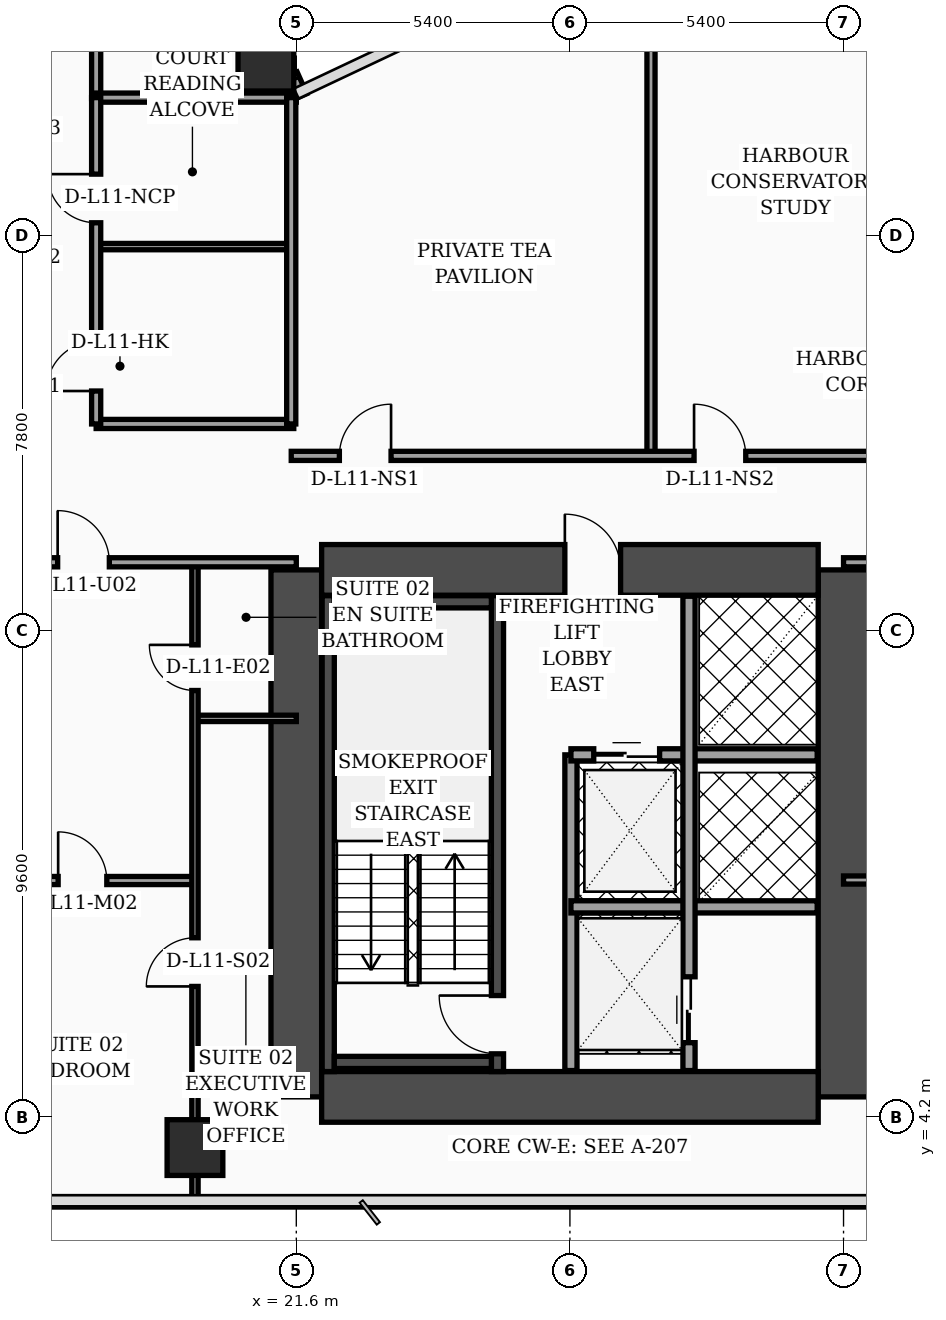
"""IFC4 building model, lengths in metres.
Left out: names, types, materials, properties, quantities, classifications, styles, units other than length and angle.
Written with IfcOpenShell. Run it as: python <this file> out.ifc"""

import sys

from ifc_helpers import new_model, si_unit, direction, frame, frame_2d, origin, origin_2d, place, context, subcontext, project, spatial, rectangle, hollow_rectangle, extrude, element, fill, save


model = new_model("IFC4")
c1 = context("Model", 3, precision=1e-05, world=origin(), true_north=direction((0.0, 1.0)))
c2 = subcontext(c1, "Body", "Model", "MODEL_VIEW")
j1 = project(units=[si_unit("LENGTHUNIT", "METRE"), si_unit("PLANEANGLEUNIT", "RADIAN")], contexts=[c1])
p1 = place(None, origin())
s1 = spatial("IfcSite", under=j1, at=p1, CompositionType="ELEMENT")
p2 = place(p1, origin())
s2 = spatial("IfcBuilding", under=s1, at=p2, CompositionType="ELEMENT")
p3 = place(p2, frame((0.0, 0.0, 50.8)))
s3 = spatial("IfcBuildingStorey", under=s2, at=p3, CompositionType="ELEMENT", Elevation=50.8)
for number, where, z_axis, x_axis in (
    (1, (21.6, 4.6, 0.0), (0.0, 0.0, 1.0), (0.0, 1.0, 0.0)),
    (2, (32.4, 4.6, 0.0), (0.0, 0.0, 1.0), (0.0, 1.0, 0.0)),
):
    element("IfcWall", number, at=place(p3, frame(where, z_axis=z_axis, x_axis=x_axis)), inside=s3, PredefinedType="SHEAR", context=c2, shape_type="SweptSolid", body=[
        extrude(rectangle(XDim=10.4, YDim=1.0, at=frame_2d((5.2, 0.0))), origin(), (0.0, 0.0, 1.0), 3.56),
    ])
p4 = place(p3, frame((22.1, 15.0, 0.0), z_axis=(0.0, 0.0, 1.0), x_axis=(1.0, 0.0, 0.0)))
e3 = element("IfcWall", 3, at=p4, inside=s3, PredefinedType="SHEAR", context=c2, shape_type="SweptSolid", body=[
    extrude(rectangle(XDim=9.8, YDim=1.0, at=frame_2d((4.9, 0.0))), origin(), (0.0, 0.0, 1.0), 3.56),
])
p5 = place(p4, frame((4.8, 0.0, 0.0)))
e4 = element("IfcOpeningElement", 4, at=p5, cuts=e3, PredefinedType="OPENING", context=c2, shape_type="SweptSolid", body=[
    extrude(rectangle(XDim=1.1, YDim=2.2, at=frame_2d((0.55, 1.1))), frame((0.0, 0.51, 0.0), z_axis=(0.0, -1.0, 0.0), x_axis=(1.0, 0.0, 0.0)), (0.0, 0.0, 1.0), 1.02),
])
p6 = place(p3, frame((22.1, 4.6, 0.0), z_axis=(0.0, 0.0, 1.0), x_axis=(1.0, 0.0, 0.0)))
e5 = element("IfcWall", 5, at=p6, inside=s3, PredefinedType="SHEAR", context=c2, shape_type="SweptSolid", body=[
    extrude(rectangle(XDim=9.8, YDim=1.0, at=frame_2d((4.9, 0.0))), origin(), (0.0, 0.0, 1.0), 3.56),
])
p7 = place(p3, frame((22.23, 5.1, 0.0), z_axis=(0.0, 0.0, 1.0), x_axis=(0.0, 1.0, 0.0)))
e6 = element("IfcWall", 6, at=p7, inside=s3, PredefinedType="SOLIDWALL", context=c2, shape_type="SweptSolid", body=[
    extrude(rectangle(XDim=9.39, YDim=0.24, at=frame_2d((4.695, 0.0))), origin(), (0.0, 0.0, 1.0), 3.56),
])
p8 = place(p3, frame((25.57, 5.1, 0.0), z_axis=(0.0, 0.0, 1.0), x_axis=(0.0, 1.0, 0.0)))
e7 = element("IfcWall", 7, at=p8, inside=s3, PredefinedType="SOLIDWALL", context=c2, shape_type="SweptSolid", body=[
    extrude(rectangle(XDim=9.39, YDim=0.24, at=frame_2d((4.695, 0.0))), origin(), (0.0, 0.0, 1.0), 3.56),
])
p9 = place(p8, frame((0.35, 0.0, 0.0)))
e8 = element("IfcOpeningElement", 8, at=p9, cuts=e7, PredefinedType="OPENING", context=c2, shape_type="SweptSolid", body=[
    extrude(rectangle(XDim=1.15, YDim=2.2, at=frame_2d((0.575, 1.1))), frame((0.0, 0.13, 0.0), z_axis=(0.0, -1.0, 0.0), x_axis=(1.0, 0.0, 0.0)), (0.0, 0.0, 1.0), 0.26),
])
for number, where, z_axis, x_axis in (
    (9, (22.35, 5.28, 0.0), (0.0, 0.0, 1.0), (1.0, 0.0, 0.0)),
    (10, (22.35, 14.37, 0.0), (0.0, 0.0, 1.0), (1.0, 0.0, 0.0)),
):
    element("IfcWall", number, at=place(p3, frame(where, z_axis=z_axis, x_axis=x_axis)), inside=s3, PredefinedType="SOLIDWALL", context=c2, shape_type="SweptSolid", body=[
        extrude(rectangle(XDim=3.1, YDim=0.24, at=frame_2d((1.55, 0.0))), origin(), (0.0, 0.0, 1.0), 3.56),
    ])
for number, where, z_axis, x_axis in (
    (11, (21.0, 25.0, 0.0), (0.0, 0.0, 1.0), (1.0, 0.0, 0.0)),
    (12, (19.6, 3.6, 0.0), (0.0, 0.0, 1.0), (1.0, 0.0, 0.0)),
):
    element("IfcColumn", number, at=place(p3, frame(where, z_axis=z_axis, x_axis=x_axis)), inside=s3, PredefinedType="COLUMN", context=c2, shape_type="SweptSolid", body=[
        extrude(hollow_rectangle(XDim=1.1, YDim=1.1, WallThickness=0.045, at=origin_2d()), origin(), (0.0, 0.0, 1.0), 3.56),
    ])
p10 = place(p3, frame((21.68, 24.34, 0.0), z_axis=(0.0, 0.0, 1.0), x_axis=(-0.40758134973, 0.913168901875, 0.0)))
e13 = element("IfcWall", 13, at=p10, inside=s3, PredefinedType="SOLIDWALL", context=c2, shape_type="SweptSolid", body=[
    extrude(rectangle(XDim=0.471, YDim=0.28, at=frame_2d((0.235, 0.0))), origin(), (0.0, 0.0, 1.0), 3.56),
])
p11 = place(p3, frame((27.02, 5.12, 0.0), z_axis=(0.0, 0.0, 1.0), x_axis=(0.0, 1.0, 0.0)))
e14 = element("IfcWall", 14, at=p11, inside=s3, PredefinedType="SOLIDWALL", context=c2, shape_type="SweptSolid", body=[
    extrude(rectangle(XDim=6.23, YDim=0.24, at=frame_2d((3.115, 0.0))), origin(), (0.0, 0.0, 1.0), 3.56),
])
p12 = place(p3, frame((27.02, 11.35, 0.0), z_axis=(0.0, 0.0, 1.0), x_axis=(1.0, 0.0, 0.0)))
e15 = element("IfcWall", 15, at=p12, inside=s3, PredefinedType="SOLIDWALL", context=c2, shape_type="SweptSolid", body=[
    extrude(rectangle(XDim=4.86, YDim=0.24, at=frame_2d((2.43, 0.0))), origin(), (0.0, 0.0, 1.0), 3.56),
])
p13 = place(p12, frame((0.45, 0.0, 0.0)))
e16 = element("IfcOpeningElement", 16, at=p13, cuts=e15, PredefinedType="OPENING", context=c2, shape_type="SweptSolid", body=[
    extrude(rectangle(XDim=1.3, YDim=2.35, at=frame_2d((0.65, 1.175))), frame((0.0, 0.13, 0.0), z_axis=(0.0, -1.0, 0.0), x_axis=(1.0, 0.0, 0.0)), (0.0, 0.0, 1.0), 0.26),
])
p14 = place(p3, frame((27.02, 8.35, 0.0), z_axis=(0.0, 0.0, 1.0), x_axis=(1.0, 0.0, 0.0)))
e17 = element("IfcWall", 17, at=p14, inside=s3, PredefinedType="SOLIDWALL", context=c2, shape_type="SweptSolid", body=[
    extrude(rectangle(XDim=4.86, YDim=0.24, at=frame_2d((2.43, 0.0))), origin(), (0.0, 0.0, 1.0), 3.09),
])
p15 = place(p3, frame((29.35, 5.12, 0.0), z_axis=(0.0, 0.0, 1.0), x_axis=(0.0, 1.0, 0.0)))
e18 = element("IfcWall", 18, at=p15, inside=s3, PredefinedType="SOLIDWALL", context=c2, shape_type="SweptSolid", body=[
    extrude(rectangle(XDim=9.36, YDim=0.24, at=frame_2d((4.68, 0.0))), origin(), (0.0, 0.0, 1.0), 3.56),
])
p16 = place(p15, frame((0.55, 0.0, 0.0)))
e19 = element("IfcOpeningElement", 19, at=p16, cuts=e18, PredefinedType="OPENING", context=c2, shape_type="SweptSolid", body=[
    extrude(rectangle(XDim=1.3, YDim=2.35, at=frame_2d((0.65, 1.175))), frame((0.0, 0.13, 0.0), z_axis=(0.0, -1.0, 0.0), x_axis=(1.0, 0.0, 0.0)), (0.0, 0.0, 1.0), 0.26),
])
p17 = place(p3, frame((19.6, 12.07, 0.0), z_axis=(0.0, 0.0, 1.0), x_axis=(1.0, 0.0, 0.0)))
e20 = element("IfcWall", 20, at=p17, inside=s3, PredefinedType="PARTITIONING", context=c2, shape_type="SweptSolid", body=[
    extrude(rectangle(XDim=2.0, YDim=0.125, at=frame_2d((1.0, 0.0))), origin(), (0.0, 0.0, 1.0), 3.56),
])
p18 = place(p3, frame((15.15, 8.87, 0.0), z_axis=(0.0, 0.0, 1.0), x_axis=(1.0, 0.0, 0.0)))
e21 = element("IfcWall", 21, at=p18, inside=s3, PredefinedType="PARTITIONING", context=c2, shape_type="SweptSolid", body=[
    extrude(rectangle(XDim=4.45, YDim=0.16, at=frame_2d((2.225, 0.0))), origin(), (0.0, 0.0, 1.0), 3.56),
])
p19 = place(p18, frame((1.75, 0.0, 0.0)))
e22 = element("IfcOpeningElement", 22, at=p19, cuts=e21, PredefinedType="OPENING", context=c2, shape_type="SweptSolid", body=[
    extrude(rectangle(XDim=0.96, YDim=2.2, at=frame_2d((0.48, 1.1))), frame((0.0, 0.09, 0.0), z_axis=(0.0, -1.0, 0.0), x_axis=(1.0, 0.0, 0.0)), (0.0, 0.0, 1.0), 0.18),
])
p20 = place(p3, frame((19.6, 2.44, 0.0), z_axis=(0.0, 0.0, 1.0), x_axis=(0.0, 1.0, 0.0)))
e23 = element("IfcWall", 23, at=p20, inside=s3, PredefinedType="PARTITIONING", context=c2, shape_type="SweptSolid", body=[
    extrude(rectangle(XDim=12.71, YDim=0.125, at=frame_2d((6.355, 0.0))), origin(), (0.0, 0.0, 1.0), 2.34),
])
p21 = place(p20, frame((4.34, 0.0, 0.0)))
e24 = element("IfcOpeningElement", 24, at=p21, cuts=e23, PredefinedType="OPENING", context=c2, shape_type="SweptSolid", body=[
    extrude(rectangle(XDim=0.96, YDim=2.2, at=frame_2d((0.48, 1.1))), frame((0.0, 0.073, 0.0), z_axis=(0.0, -1.0, 0.0), x_axis=(1.0, 0.0, 0.0)), (0.0, 0.0, 1.0), 0.145),
])
p22 = place(p20, frame((10.18, 0.0, 0.0)))
e25 = element("IfcOpeningElement", 25, at=p22, cuts=e23, PredefinedType="OPENING", context=c2, shape_type="SweptSolid", body=[
    extrude(rectangle(XDim=0.9, YDim=2.15, at=frame_2d((0.45, 1.075))), frame((0.0, 0.073, 0.0), z_axis=(0.0, -1.0, 0.0), x_axis=(1.0, 0.0, 0.0)), (0.0, 0.0, 1.0), 0.145),
])
p23 = place(p3, frame((15.15, 15.15, 0.0), z_axis=(0.0, 0.0, 1.0), x_axis=(1.0, 0.0, 0.0)))
e26 = element("IfcWall", 26, at=p23, inside=s3, PredefinedType="PARTITIONING", context=c2, shape_type="SweptSolid", body=[
    extrude(rectangle(XDim=6.45, YDim=0.18, at=frame_2d((3.225, 0.0))), origin(), (0.0, 0.0, 1.0), 2.34),
])
p24 = place(p23, frame((1.74, 0.0, 0.0)))
e27 = element("IfcOpeningElement", 27, at=p24, cuts=e26, PredefinedType="OPENING", context=c2, shape_type="SweptSolid", body=[
    extrude(rectangle(XDim=1.02, YDim=2.2, at=frame_2d((0.51, 1.1))), frame((0.0, 0.1, 0.0), z_axis=(0.0, -1.0, 0.0), x_axis=(1.0, 0.0, 0.0)), (0.0, 0.0, 1.0), 0.2),
])
p25 = place(p3, frame((17.65, 24.3, 0.0), z_axis=(0.0, 0.0, 1.0), x_axis=(0.0, 1.0, 0.0)))
e28 = element("IfcWall", 28, at=p25, inside=s3, PredefinedType="PARTITIONING", context=c2, shape_type="SweptSolid", body=[
    extrude(rectangle(XDim=16.4, YDim=0.18, at=frame_2d((8.2, 0.0))), origin(), (0.0, 0.0, 1.0), 2.84),
])
p26 = place(p3, frame((17.65, 17.88, 0.0), z_axis=(0.0, 0.0, 1.0), x_axis=(1.0, 0.0, 0.0)))
e29 = element("IfcWall", 29, at=p26, inside=s3, PredefinedType="PARTITIONING", context=c2, shape_type="SweptSolid", body=[
    extrude(rectangle(XDim=3.9, YDim=0.18, at=frame_2d((1.95, 0.0))), origin(), (0.0, 0.0, 1.0), 3.56),
])
p27 = place(p3, frame((17.65, 21.38, 0.0), z_axis=(0.0, 0.0, 1.0), x_axis=(1.0, 0.0, 0.0)))
e30 = element("IfcWall", 30, at=p27, inside=s3, PredefinedType="PARTITIONING", context=c2, shape_type="SweptSolid", body=[
    extrude(rectangle(XDim=3.9, YDim=0.125, at=frame_2d((1.95, 0.0))), origin(), (0.0, 0.0, 1.0), 3.56),
])
p28 = place(p3, frame((17.65, 24.32, 0.0), z_axis=(0.0, 0.0, 1.0), x_axis=(1.0, 0.0, 0.0)))
e31 = element("IfcWall", 31, at=p28, inside=s3, PredefinedType="PARTITIONING", context=c2, shape_type="SweptSolid", body=[
    extrude(rectangle(XDim=3.95, YDim=0.18, at=frame_2d((1.975, 0.0))), origin(), (0.0, 0.0, 1.0), 3.56),
])
p29 = place(p3, frame((21.5, 17.88, 0.0), z_axis=(0.0, 0.0, 1.0), x_axis=(0.0, 1.0, 0.0)))
e32 = element("IfcWall", 32, at=p29, inside=s3, PredefinedType="PARTITIONING", context=c2, shape_type="SweptSolid", body=[
    extrude(rectangle(XDim=6.44, YDim=0.18, at=frame_2d((3.22, 0.0))), origin(), (0.0, 0.0, 1.0), 3.56),
])
p30 = place(p3, frame((17.65, 17.88, 0.0), z_axis=(0.0, 0.0, 1.0), x_axis=(0.0, 1.0, 0.0)))
e33 = element("IfcWall", 33, at=p30, inside=s3, PredefinedType="PARTITIONING", context=c2, shape_type="SweptSolid", body=[
    extrude(rectangle(XDim=6.44, YDim=0.18, at=frame_2d((3.22, 0.0))), origin(), (0.0, 0.0, 1.0), 3.56),
])
p31 = place(p30, frame((0.65, 0.0, 0.0)))
e34 = element("IfcOpeningElement", 34, at=p31, cuts=e33, PredefinedType="OPENING", context=c2, shape_type="SweptSolid", body=[
    extrude(rectangle(XDim=0.98, YDim=2.15, at=frame_2d((0.49, 1.075))), frame((0.0, 0.1, 0.0), z_axis=(0.0, -1.0, 0.0), x_axis=(1.0, 0.0, 0.0)), (0.0, 0.0, 1.0), 0.2),
])
p32 = place(p30, frame((3.97, 0.0, 0.0)))
e35 = element("IfcOpeningElement", 35, at=p32, cuts=e33, PredefinedType="OPENING", context=c2, shape_type="SweptSolid", body=[
    extrude(rectangle(XDim=0.96, YDim=2.2, at=frame_2d((0.48, 1.1))), frame((0.0, 0.1, 0.0), z_axis=(0.0, -1.0, 0.0), x_axis=(1.0, 0.0, 0.0)), (0.0, 0.0, 1.0), 0.2),
])
p33 = place(p3, frame((32.4, 8.88, 0.0), z_axis=(0.0, 0.0, 1.0), x_axis=(1.0, 0.0, 0.0)))
e36 = element("IfcWall", 36, at=p33, inside=s3, PredefinedType="PARTITIONING", context=c2, shape_type="SweptSolid", body=[
    extrude(rectangle(XDim=4.8, YDim=0.16, at=frame_2d((2.4, 0.0))), origin(), (0.0, 0.0, 1.0), 2.84),
])
p34 = place(p33, frame((1.92, 0.0, 0.0)))
e37 = element("IfcOpeningElement", 37, at=p34, cuts=e36, PredefinedType="OPENING", context=c2, shape_type="SweptSolid", body=[
    extrude(rectangle(XDim=0.96, YDim=2.2, at=frame_2d((0.48, 1.1))), frame((0.0, 0.09, 0.0), z_axis=(0.0, -1.0, 0.0), x_axis=(1.0, 0.0, 0.0)), (0.0, 0.0, 1.0), 0.18),
])
p35 = place(p3, frame((32.4, 15.15, 0.0), z_axis=(0.0, 0.0, 1.0), x_axis=(1.0, 0.0, 0.0)))
e38 = element("IfcWall", 38, at=p35, inside=s3, PredefinedType="PARTITIONING", context=c2, shape_type="SweptSolid", body=[
    extrude(rectangle(XDim=16.95, YDim=0.18, at=frame_2d((8.475, 0.0))), origin(), (0.0, 0.0, 1.0), 2.84),
])
p36 = place(p35, frame((1.99, 0.0, 0.0)))
e39 = element("IfcOpeningElement", 39, at=p36, cuts=e38, PredefinedType="OPENING", context=c2, shape_type="SweptSolid", body=[
    extrude(rectangle(XDim=1.02, YDim=2.2, at=frame_2d((0.51, 1.1))), frame((0.0, 0.1, 0.0), z_axis=(0.0, -1.0, 0.0), x_axis=(1.0, 0.0, 0.0)), (0.0, 0.0, 1.0), 0.2),
])
p37 = place(p35, frame((7.58, 0.0, 0.0)))
e40 = element("IfcOpeningElement", 40, at=p37, cuts=e38, PredefinedType="OPENING", context=c2, shape_type="SweptSolid", body=[
    extrude(rectangle(XDim=1.02, YDim=2.2, at=frame_2d((0.51, 1.1))), frame((0.0, 0.1, 0.0), z_axis=(0.0, -1.0, 0.0), x_axis=(1.0, 0.0, 0.0)), (0.0, 0.0, 1.0), 0.2),
])
p38 = place(p35, frame((12.69, 0.0, 0.0)))
e41 = element("IfcOpeningElement", 41, at=p38, cuts=e38, PredefinedType="OPENING", context=c2, shape_type="SweptSolid", body=[
    extrude(rectangle(XDim=1.02, YDim=2.2, at=frame_2d((0.51, 1.1))), frame((0.0, 0.1, 0.0), z_axis=(0.0, -1.0, 0.0), x_axis=(1.0, 0.0, 0.0)), (0.0, 0.0, 1.0), 0.2),
])
p39 = place(p3, frame((28.6, 17.25, 0.0), z_axis=(0.0, 0.0, 1.0), x_axis=(0.0, 1.0, 0.0)))
e42 = element("IfcWall", 42, at=p39, inside=s3, PredefinedType="PARTITIONING", context=c2, shape_type="SweptSolid", body=[
    extrude(rectangle(XDim=10.54, YDim=0.16, at=frame_2d((5.27, 0.0))), origin(), (0.0, 0.0, 1.0), 2.84),
])
p40 = place(p3, frame((21.5, 17.25, 0.0), z_axis=(0.0, 0.0, 1.0), x_axis=(1.0, 0.0, 0.0)))
e43 = element("IfcWall", 43, at=p40, inside=s3, PredefinedType="PARTITIONING", context=c2, shape_type="SweptSolid", body=[
    extrude(rectangle(XDim=25.5, YDim=0.18, at=frame_2d((12.75, 0.0))), origin(), (0.0, 0.0, 1.0), 2.84),
])
p41 = place(p40, frame((0.95, 0.0, 0.0)))
e44 = element("IfcOpeningElement", 44, at=p41, cuts=e43, PredefinedType="OPENING", context=c2, shape_type="SweptSolid", body=[
    extrude(rectangle(XDim=1.02, YDim=2.2, at=frame_2d((0.51, 1.1))), frame((0.0, 0.1, 0.0), z_axis=(0.0, -1.0, 0.0), x_axis=(1.0, 0.0, 0.0)), (0.0, 0.0, 1.0), 0.2),
])
p42 = place(p40, frame((7.95, 0.0, 0.0)))
e45 = element("IfcOpeningElement", 45, at=p42, cuts=e43, PredefinedType="OPENING", context=c2, shape_type="SweptSolid", body=[
    extrude(rectangle(XDim=1.02, YDim=2.2, at=frame_2d((0.51, 1.1))), frame((0.0, 0.1, 0.0), z_axis=(0.0, -1.0, 0.0), x_axis=(1.0, 0.0, 0.0)), (0.0, 0.0, 1.0), 0.2),
])
p43 = place(p40, frame((13.65, 0.0, 0.0)))
e46 = element("IfcOpeningElement", 46, at=p43, cuts=e43, PredefinedType="OPENING", context=c2, shape_type="SweptSolid", body=[
    extrude(rectangle(XDim=1.02, YDim=2.2, at=frame_2d((0.51, 1.1))), frame((0.0, 0.1, 0.0), z_axis=(0.0, -1.0, 0.0), x_axis=(1.0, 0.0, 0.0)), (0.0, 0.0, 1.0), 0.2),
])
p44 = place(p40, frame((20.0, 0.0, 0.0)))
e47 = element("IfcOpeningElement", 47, at=p44, cuts=e43, PredefinedType="OPENING", context=c2, shape_type="SweptSolid", body=[
    extrude(rectangle(XDim=1.02, YDim=2.2, at=frame_2d((0.51, 1.1))), frame((0.0, 0.1, 0.0), z_axis=(0.0, -1.0, 0.0), x_axis=(1.0, 0.0, 0.0)), (0.0, 0.0, 1.0), 0.2),
])
p45 = place(p13, origin())
e48 = element("IfcDoor", 48, at=p45, inside=s3, OperationType="DOUBLE_DOOR_SLIDING", PredefinedType="DOOR", context=c2, shape_type="SweptSolid", body=[
    extrude(rectangle(XDim=1.3, YDim=2.35, at=frame_2d((0.65, 1.175))), frame((0.0, 0.025, 0.0), z_axis=(0.0, -1.0, 0.0), x_axis=(1.0, 0.0, 0.0)), (0.0, 0.0, 1.0), 0.05),
])
fill(e16, e48)
p46 = place(p16, origin())
e49 = element("IfcDoor", 49, at=p46, inside=s3, OperationType="DOUBLE_DOOR_SLIDING", PredefinedType="DOOR", context=c2, shape_type="SweptSolid", body=[
    extrude(rectangle(XDim=1.3, YDim=2.35, at=frame_2d((0.65, 1.175))), frame((0.0, 0.025, 0.0), z_axis=(0.0, -1.0, 0.0), x_axis=(1.0, 0.0, 0.0)), (0.0, 0.0, 1.0), 0.05),
])
fill(e19, e49)
p47 = place(p19, origin())
e50 = element("IfcDoor", 50, at=p47, inside=s3, OperationType="SINGLE_SWING_LEFT", PredefinedType="DOOR", context=c2, shape_type="SweptSolid", body=[
    extrude(rectangle(XDim=0.96, YDim=2.2, at=frame_2d((0.48, 1.1))), frame((0.0, 0.025, 0.0), z_axis=(0.0, -1.0, 0.0), x_axis=(1.0, 0.0, 0.0)), (0.0, 0.0, 1.0), 0.05),
])
fill(e22, e50)
p48 = place(p21, origin())
e51 = element("IfcDoor", 51, at=p48, inside=s3, OperationType="SINGLE_SWING_LEFT", PredefinedType="DOOR", context=c2, shape_type="SweptSolid", body=[
    extrude(rectangle(XDim=0.96, YDim=2.2, at=frame_2d((0.48, 1.1))), frame((0.0, 0.025, 0.0), z_axis=(0.0, -1.0, 0.0), x_axis=(1.0, 0.0, 0.0)), (0.0, 0.0, 1.0), 0.05),
])
fill(e24, e51)
p49 = place(p22, origin())
e52 = element("IfcDoor", 52, at=p49, inside=s3, OperationType="SINGLE_SWING_RIGHT", PredefinedType="DOOR", context=c2, shape_type="SweptSolid", body=[
    extrude(rectangle(XDim=0.9, YDim=2.15, at=frame_2d((0.45, 1.075))), frame((0.0, 0.025, 0.0), z_axis=(0.0, -1.0, 0.0), x_axis=(1.0, 0.0, 0.0)), (0.0, 0.0, 1.0), 0.05),
])
fill(e25, e52)
p50 = place(p24, origin())
e53 = element("IfcDoor", 53, at=p50, inside=s3, OperationType="SINGLE_SWING_LEFT", PredefinedType="DOOR", context=c2, shape_type="SweptSolid", body=[
    extrude(rectangle(XDim=1.02, YDim=2.2, at=frame_2d((0.51, 1.1))), frame((0.0, 0.025, 0.0), z_axis=(0.0, -1.0, 0.0), x_axis=(1.0, 0.0, 0.0)), (0.0, 0.0, 1.0), 0.05),
])
fill(e27, e53)
p51 = place(p31, origin())
e54 = element("IfcDoor", 54, at=p51, inside=s3, OperationType="SINGLE_SWING_LEFT", PredefinedType="DOOR", context=c2, shape_type="SweptSolid", body=[
    extrude(rectangle(XDim=0.98, YDim=2.15, at=frame_2d((0.49, 1.075))), frame((0.0, 0.025, 0.0), z_axis=(0.0, -1.0, 0.0), x_axis=(1.0, 0.0, 0.0)), (0.0, 0.0, 1.0), 0.05),
])
fill(e34, e54)
p52 = place(p32, origin())
e55 = element("IfcDoor", 55, at=p52, inside=s3, OperationType="SINGLE_SWING_RIGHT", PredefinedType="DOOR", context=c2, shape_type="SweptSolid", body=[
    extrude(rectangle(XDim=0.96, YDim=2.2, at=frame_2d((0.48, 1.1))), frame((0.0, 0.025, 0.0), z_axis=(0.0, -1.0, 0.0), x_axis=(1.0, 0.0, 0.0)), (0.0, 0.0, 1.0), 0.05),
])
fill(e35, e55)
p53 = place(p41, origin())
e56 = element("IfcDoor", 56, at=p53, inside=s3, OperationType="SINGLE_SWING_RIGHT", PredefinedType="DOOR", context=c2, shape_type="SweptSolid", body=[
    extrude(rectangle(XDim=1.02, YDim=2.2, at=frame_2d((0.51, 1.1))), frame((0.0, 0.025, 0.0), z_axis=(0.0, -1.0, 0.0), x_axis=(1.0, 0.0, 0.0)), (0.0, 0.0, 1.0), 0.05),
])
fill(e44, e56)
p54 = place(p42, origin())
e57 = element("IfcDoor", 57, at=p54, inside=s3, OperationType="SINGLE_SWING_LEFT", PredefinedType="DOOR", context=c2, shape_type="SweptSolid", body=[
    extrude(rectangle(XDim=1.02, YDim=2.2, at=frame_2d((0.51, 1.1))), frame((0.0, 0.025, 0.0), z_axis=(0.0, -1.0, 0.0), x_axis=(1.0, 0.0, 0.0)), (0.0, 0.0, 1.0), 0.05),
])
fill(e45, e57)
p55 = place(p9, origin())
e58 = element("IfcDoor", 58, at=p55, inside=s3, OperationType="SINGLE_SWING_RIGHT", PredefinedType="DOOR", context=c2, shape_type="SweptSolid", body=[
    extrude(rectangle(XDim=1.15, YDim=2.2, at=frame_2d((0.575, 1.1))), frame((0.0, 0.025, 0.0), z_axis=(0.0, -1.0, 0.0), x_axis=(1.0, 0.0, 0.0)), (0.0, 0.0, 1.0), 0.05),
])
fill(e8, e58)
p56 = place(p5, origin())
e59 = element("IfcDoor", 59, at=p56, inside=s3, OperationType="SINGLE_SWING_LEFT", PredefinedType="DOOR", context=c2, shape_type="SweptSolid", body=[
    extrude(rectangle(XDim=1.1, YDim=2.2, at=frame_2d((0.55, 1.1))), frame((0.0, 0.025, 0.0), z_axis=(0.0, -1.0, 0.0), x_axis=(1.0, 0.0, 0.0)), (0.0, 0.0, 1.0), 0.05),
])
fill(e4, e59)
save(model, sys.argv[1])
